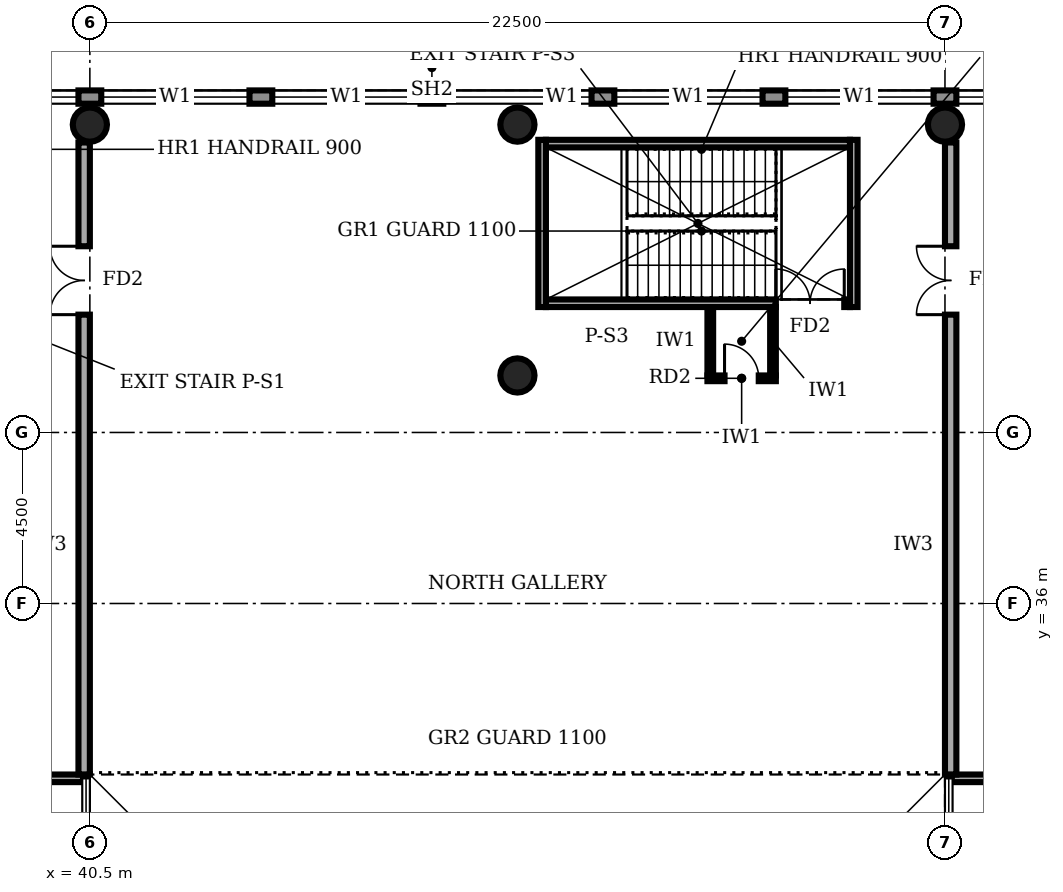
"""IFC4 building model, lengths in metres.
Left out: names, types, materials, properties, quantities, classifications, styles, units other than length and angle.
Written with IfcOpenShell. Run it as: python <this file> out.ifc"""

import sys

from ifc_helpers import new_model, si_unit, direction, frame, frame_2d, origin, origin_2d, place, context, subcontext, project, spatial, rectangle, circle, extrude, element, fill, save


model = new_model("IFC4")
c1 = context("Model", 3, precision=1e-05, world=origin(), true_north=direction((0.0, 1.0)))
c2 = subcontext(c1, "Body", "Model", "MODEL_VIEW")
j1 = project(units=[si_unit("LENGTHUNIT", "METRE"), si_unit("PLANEANGLEUNIT", "RADIAN")], contexts=[c1])
p1 = place(None, origin())
s1 = spatial("IfcSite", under=j1, at=p1, CompositionType="ELEMENT")
p2 = place(p1, origin())
s2 = spatial("IfcBuilding", under=s1, at=p2, CompositionType="ELEMENT")
p3 = place(p2, frame((0.0, 0.0, 11.0)))
s3 = spatial("IfcBuildingStorey", under=s2, at=p3, CompositionType="ELEMENT", Elevation=11.0)
for number, where, z_axis, x_axis in (
    (1, (51.75, 42.0, 0.0), (0.0, 0.0, 1.0), (1.0, 0.0, 0.0)),
    (2, (40.5, 48.6, 0.0), (0.0, 0.0, 1.0), (1.0, 0.0, 0.0)),
    (3, (51.75, 48.6, 0.0), (0.0, 0.0, 1.0), (1.0, 0.0, 0.0)),
    (4, (63.0, 48.6, 0.0), (0.0, 0.0, 1.0), (1.0, 0.0, 0.0)),
):
    element("IfcColumn", number, at=place(p3, frame(where, z_axis=z_axis, x_axis=x_axis)), inside=s3, PredefinedType="COLUMN", context=c2, shape_type="SweptSolid", body=[
        extrude(circle(Radius=0.45, at=origin_2d()), origin(), (0.0, 0.0, 1.0), 5.0),
    ])
p4 = place(p3, frame((98.98, 49.325, 0.0), z_axis=(0.0, 0.0, 1.0), x_axis=(-1.0, 0.0, 0.0)))
e5 = element("IfcWall", 5, at=p4, inside=s3, PredefinedType="STANDARD", context=c2, shape_type="SweptSolid", body=[
    extrude(rectangle(XDim=98.96, YDim=0.35, at=frame_2d((49.48, 0.0))), origin(), (0.0, 0.0, 1.0), 4.7),
])
p5 = place(p4, frame((94.71, 0.0, 0.9)))
e6 = element("IfcOpeningElement", 6, at=p5, cuts=e5, PredefinedType="OPENING", context=c2, shape_type="SweptSolid", body=[
    extrude(rectangle(XDim=3.9, YDim=2.2, at=frame_2d((1.95, 1.1))), frame((0.0, 0.185, 0.0), z_axis=(0.0, -1.0, 0.0), x_axis=(1.0, 0.0, 0.0)), (0.0, 0.0, 1.0), 0.37),
])
p6 = place(p4, frame((90.28, 0.0, 0.9)))
e7 = element("IfcOpeningElement", 7, at=p6, cuts=e5, PredefinedType="OPENING", context=c2, shape_type="SweptSolid", body=[
    extrude(rectangle(XDim=3.9, YDim=2.2, at=frame_2d((1.95, 1.1))), frame((0.0, 0.185, 0.0), z_axis=(0.0, -1.0, 0.0), x_axis=(1.0, 0.0, 0.0)), (0.0, 0.0, 1.0), 0.37),
])
p7 = place(p4, frame((85.78, 0.0, 0.9)))
e8 = element("IfcOpeningElement", 8, at=p7, cuts=e5, PredefinedType="OPENING", context=c2, shape_type="SweptSolid", body=[
    extrude(rectangle(XDim=3.9, YDim=2.2, at=frame_2d((1.95, 1.1))), frame((0.0, 0.185, 0.0), z_axis=(0.0, -1.0, 0.0), x_axis=(1.0, 0.0, 0.0)), (0.0, 0.0, 1.0), 0.37),
])
p8 = place(p4, frame((81.28, 0.0, 0.9)))
e9 = element("IfcOpeningElement", 9, at=p8, cuts=e5, PredefinedType="OPENING", context=c2, shape_type="SweptSolid", body=[
    extrude(rectangle(XDim=3.9, YDim=2.2, at=frame_2d((1.95, 1.1))), frame((0.0, 0.185, 0.0), z_axis=(0.0, -1.0, 0.0), x_axis=(1.0, 0.0, 0.0)), (0.0, 0.0, 1.0), 0.37),
])
p9 = place(p4, frame((76.78, 0.0, 0.9)))
e10 = element("IfcOpeningElement", 10, at=p9, cuts=e5, PredefinedType="OPENING", context=c2, shape_type="SweptSolid", body=[
    extrude(rectangle(XDim=3.9, YDim=2.2, at=frame_2d((1.95, 1.1))), frame((0.0, 0.185, 0.0), z_axis=(0.0, -1.0, 0.0), x_axis=(1.0, 0.0, 0.0)), (0.0, 0.0, 1.0), 0.37),
])
p10 = place(p4, frame((72.28, 0.0, 0.9)))
e11 = element("IfcOpeningElement", 11, at=p10, cuts=e5, PredefinedType="OPENING", context=c2, shape_type="SweptSolid", body=[
    extrude(rectangle(XDim=3.9, YDim=2.2, at=frame_2d((1.95, 1.1))), frame((0.0, 0.185, 0.0), z_axis=(0.0, -1.0, 0.0), x_axis=(1.0, 0.0, 0.0)), (0.0, 0.0, 1.0), 0.37),
])
p11 = place(p4, frame((67.78, 0.0, 0.9)))
e12 = element("IfcOpeningElement", 12, at=p11, cuts=e5, PredefinedType="OPENING", context=c2, shape_type="SweptSolid", body=[
    extrude(rectangle(XDim=3.9, YDim=2.2, at=frame_2d((1.95, 1.1))), frame((0.0, 0.185, 0.0), z_axis=(0.0, -1.0, 0.0), x_axis=(1.0, 0.0, 0.0)), (0.0, 0.0, 1.0), 0.37),
])
p12 = place(p4, frame((63.28, 0.0, 0.9)))
e13 = element("IfcOpeningElement", 13, at=p12, cuts=e5, PredefinedType="OPENING", context=c2, shape_type="SweptSolid", body=[
    extrude(rectangle(XDim=3.9, YDim=2.2, at=frame_2d((1.95, 1.1))), frame((0.0, 0.185, 0.0), z_axis=(0.0, -1.0, 0.0), x_axis=(1.0, 0.0, 0.0)), (0.0, 0.0, 1.0), 0.37),
])
p13 = place(p4, frame((58.78, 0.0, 0.9)))
e14 = element("IfcOpeningElement", 14, at=p13, cuts=e5, PredefinedType="OPENING", context=c2, shape_type="SweptSolid", body=[
    extrude(rectangle(XDim=3.9, YDim=2.2, at=frame_2d((1.95, 1.1))), frame((0.0, 0.185, 0.0), z_axis=(0.0, -1.0, 0.0), x_axis=(1.0, 0.0, 0.0)), (0.0, 0.0, 1.0), 0.37),
])
p14 = place(p4, frame((54.28, 0.0, 0.9)))
e15 = element("IfcOpeningElement", 15, at=p14, cuts=e5, PredefinedType="OPENING", context=c2, shape_type="SweptSolid", body=[
    extrude(rectangle(XDim=3.9, YDim=2.2, at=frame_2d((1.95, 1.1))), frame((0.0, 0.185, 0.0), z_axis=(0.0, -1.0, 0.0), x_axis=(1.0, 0.0, 0.0)), (0.0, 0.0, 1.0), 0.37),
])
p15 = place(p4, frame((49.78, 0.0, 0.9)))
e16 = element("IfcOpeningElement", 16, at=p15, cuts=e5, PredefinedType="OPENING", context=c2, shape_type="SweptSolid", body=[
    extrude(rectangle(XDim=3.9, YDim=2.2, at=frame_2d((1.95, 1.1))), frame((0.0, 0.185, 0.0), z_axis=(0.0, -1.0, 0.0), x_axis=(1.0, 0.0, 0.0)), (0.0, 0.0, 1.0), 0.37),
])
p16 = place(p4, frame((45.28, 0.0, 0.9)))
e17 = element("IfcOpeningElement", 17, at=p16, cuts=e5, PredefinedType="OPENING", context=c2, shape_type="SweptSolid", body=[
    extrude(rectangle(XDim=3.9, YDim=2.2, at=frame_2d((1.95, 1.1))), frame((0.0, 0.185, 0.0), z_axis=(0.0, -1.0, 0.0), x_axis=(1.0, 0.0, 0.0)), (0.0, 0.0, 1.0), 0.37),
])
p17 = place(p4, frame((40.78, 0.0, 0.9)))
e18 = element("IfcOpeningElement", 18, at=p17, cuts=e5, PredefinedType="OPENING", context=c2, shape_type="SweptSolid", body=[
    extrude(rectangle(XDim=3.9, YDim=2.2, at=frame_2d((1.95, 1.1))), frame((0.0, 0.185, 0.0), z_axis=(0.0, -1.0, 0.0), x_axis=(1.0, 0.0, 0.0)), (0.0, 0.0, 1.0), 0.37),
])
p18 = place(p4, frame((36.28, 0.0, 0.9)))
e19 = element("IfcOpeningElement", 19, at=p18, cuts=e5, PredefinedType="OPENING", context=c2, shape_type="SweptSolid", body=[
    extrude(rectangle(XDim=3.9, YDim=2.2, at=frame_2d((1.95, 1.1))), frame((0.0, 0.185, 0.0), z_axis=(0.0, -1.0, 0.0), x_axis=(1.0, 0.0, 0.0)), (0.0, 0.0, 1.0), 0.37),
])
p19 = place(p4, frame((31.78, 0.0, 0.9)))
e20 = element("IfcOpeningElement", 20, at=p19, cuts=e5, PredefinedType="OPENING", context=c2, shape_type="SweptSolid", body=[
    extrude(rectangle(XDim=3.9, YDim=2.2, at=frame_2d((1.95, 1.1))), frame((0.0, 0.185, 0.0), z_axis=(0.0, -1.0, 0.0), x_axis=(1.0, 0.0, 0.0)), (0.0, 0.0, 1.0), 0.37),
])
p20 = place(p4, frame((27.28, 0.0, 0.9)))
e21 = element("IfcOpeningElement", 21, at=p20, cuts=e5, PredefinedType="OPENING", context=c2, shape_type="SweptSolid", body=[
    extrude(rectangle(XDim=3.9, YDim=2.2, at=frame_2d((1.95, 1.1))), frame((0.0, 0.185, 0.0), z_axis=(0.0, -1.0, 0.0), x_axis=(1.0, 0.0, 0.0)), (0.0, 0.0, 1.0), 0.37),
])
p21 = place(p4, frame((22.78, 0.0, 0.9)))
e22 = element("IfcOpeningElement", 22, at=p21, cuts=e5, PredefinedType="OPENING", context=c2, shape_type="SweptSolid", body=[
    extrude(rectangle(XDim=3.9, YDim=2.2, at=frame_2d((1.95, 1.1))), frame((0.0, 0.185, 0.0), z_axis=(0.0, -1.0, 0.0), x_axis=(1.0, 0.0, 0.0)), (0.0, 0.0, 1.0), 0.37),
])
p22 = place(p4, frame((18.28, 0.0, 0.9)))
e23 = element("IfcOpeningElement", 23, at=p22, cuts=e5, PredefinedType="OPENING", context=c2, shape_type="SweptSolid", body=[
    extrude(rectangle(XDim=3.9, YDim=2.2, at=frame_2d((1.95, 1.1))), frame((0.0, 0.185, 0.0), z_axis=(0.0, -1.0, 0.0), x_axis=(1.0, 0.0, 0.0)), (0.0, 0.0, 1.0), 0.37),
])
p23 = place(p4, frame((13.78, 0.0, 0.9)))
e24 = element("IfcOpeningElement", 24, at=p23, cuts=e5, PredefinedType="OPENING", context=c2, shape_type="SweptSolid", body=[
    extrude(rectangle(XDim=3.9, YDim=2.2, at=frame_2d((1.95, 1.1))), frame((0.0, 0.185, 0.0), z_axis=(0.0, -1.0, 0.0), x_axis=(1.0, 0.0, 0.0)), (0.0, 0.0, 1.0), 0.37),
])
p24 = place(p4, frame((9.28, 0.0, 0.9)))
e25 = element("IfcOpeningElement", 25, at=p24, cuts=e5, PredefinedType="OPENING", context=c2, shape_type="SweptSolid", body=[
    extrude(rectangle(XDim=3.9, YDim=2.2, at=frame_2d((1.95, 1.1))), frame((0.0, 0.185, 0.0), z_axis=(0.0, -1.0, 0.0), x_axis=(1.0, 0.0, 0.0)), (0.0, 0.0, 1.0), 0.37),
])
p25 = place(p4, frame((4.78, 0.0, 0.9)))
e26 = element("IfcOpeningElement", 26, at=p25, cuts=e5, PredefinedType="OPENING", context=c2, shape_type="SweptSolid", body=[
    extrude(rectangle(XDim=3.9, YDim=2.2, at=frame_2d((1.95, 1.1))), frame((0.0, 0.185, 0.0), z_axis=(0.0, -1.0, 0.0), x_axis=(1.0, 0.0, 0.0)), (0.0, 0.0, 1.0), 0.37),
])
p26 = place(p3, frame((28.8, 31.4, 0.0), z_axis=(0.0, 0.0, 1.0), x_axis=(1.0, 0.0, 0.0)))
e27 = element("IfcWall", 27, at=p26, inside=s3, PredefinedType="SOLIDWALL", context=c2, shape_type="SweptSolid", body=[
    extrude(rectangle(XDim=11.52, YDim=0.2, at=frame_2d((5.76, 0.0))), origin(), (0.0, 0.0, 1.0), 4.7),
])
p27 = place(p3, frame((63.18, 31.4, 0.0), z_axis=(0.0, 0.0, 1.0), x_axis=(1.0, 0.0, 0.0)))
e28 = element("IfcWall", 28, at=p27, inside=s3, PredefinedType="SOLIDWALL", context=c2, shape_type="SweptSolid", body=[
    extrude(rectangle(XDim=9.27, YDim=0.2, at=frame_2d((4.635, 0.0))), origin(), (0.0, 0.0, 1.0), 4.7),
])
p28 = place(p3, frame((52.5, 43.9, 0.0), z_axis=(0.0, 0.0, 1.0), x_axis=(1.0, 0.0, 0.0)))
e29 = element("IfcWall", 29, at=p28, inside=s3, PredefinedType="SOLIDWALL", context=c2, shape_type="SweptSolid", body=[
    extrude(rectangle(XDim=8.0, YDim=0.2, at=frame_2d((4.0, 0.0))), origin(), (0.0, 0.0, 1.0), 4.7),
])
p29 = place(p28, frame((6.05, 0.0, 0.0)))
e30 = element("IfcOpeningElement", 30, at=p29, cuts=e29, PredefinedType="OPENING", context=c2, shape_type="SweptSolid", body=[
    extrude(rectangle(XDim=1.8, YDim=2.1, at=frame_2d((0.9, 1.05))), frame((0.0, 0.11, 0.0), z_axis=(0.0, -1.0, 0.0), x_axis=(1.0, 0.0, 0.0)), (0.0, 0.0, 1.0), 0.22),
])
p30 = place(p3, frame((52.5, 48.1, 0.0), z_axis=(0.0, 0.0, 1.0), x_axis=(1.0, 0.0, 0.0)))
e31 = element("IfcWall", 31, at=p30, inside=s3, PredefinedType="SOLIDWALL", context=c2, shape_type="SweptSolid", body=[
    extrude(rectangle(XDim=8.0, YDim=0.2, at=frame_2d((4.0, 0.0))), origin(), (0.0, 0.0, 1.0), 4.7),
])
for number, where, z_axis, x_axis in (
    (32, (52.4, 43.8, 0.0), (0.0, 0.0, 1.0), (0.0, 1.0, 0.0)),
    (33, (60.6, 43.8, 0.0), (0.0, 0.0, 1.0), (0.0, 1.0, 0.0)),
):
    element("IfcWall", number, at=place(p3, frame(where, z_axis=z_axis, x_axis=x_axis)), inside=s3, PredefinedType="SOLIDWALL", context=c2, shape_type="SweptSolid", body=[
        extrude(rectangle(XDim=4.4, YDim=0.2, at=frame_2d((2.2, 0.0))), origin(), (0.0, 0.0, 1.0), 4.7),
    ])
p31 = place(p3, frame((40.35, 31.5, 0.0), z_axis=(0.0, 0.0, 1.0), x_axis=(0.0, 1.0, 0.0)))
e34 = element("IfcWall", 34, at=p31, inside=s3, PredefinedType="SOLIDWALL", context=c2, shape_type="SweptSolid", body=[
    extrude(rectangle(XDim=16.63, YDim=0.3, at=frame_2d((8.315, 0.0))), origin(), (0.0, 0.0, 1.0), 4.7),
])
p32 = place(p31, frame((12.1, 0.0, 0.0)))
e35 = element("IfcOpeningElement", 35, at=p32, cuts=e34, PredefinedType="OPENING", context=c2, shape_type="SweptSolid", body=[
    extrude(rectangle(XDim=1.8, YDim=2.1, at=frame_2d((0.9, 1.05))), frame((0.0, 0.16, 0.0), z_axis=(0.0, -1.0, 0.0), x_axis=(1.0, 0.0, 0.0)), (0.0, 0.0, 1.0), 0.32),
])
p33 = place(p3, frame((63.15, 31.5, 0.0), z_axis=(0.0, 0.0, 1.0), x_axis=(0.0, 1.0, 0.0)))
e36 = element("IfcWall", 36, at=p33, inside=s3, PredefinedType="SOLIDWALL", context=c2, shape_type="SweptSolid", body=[
    extrude(rectangle(XDim=16.63, YDim=0.3, at=frame_2d((8.315, 0.0))), origin(), (0.0, 0.0, 1.0), 4.7),
])
p34 = place(p33, frame((12.1, 0.0, 0.0)))
e37 = element("IfcOpeningElement", 37, at=p34, cuts=e36, PredefinedType="OPENING", context=c2, shape_type="SweptSolid", body=[
    extrude(rectangle(XDim=1.8, YDim=2.1, at=frame_2d((0.9, 1.05))), frame((0.0, 0.16, 0.0), z_axis=(0.0, -1.0, 0.0), x_axis=(1.0, 0.0, 0.0)), (0.0, 0.0, 1.0), 0.32),
])
p35 = place(p3, frame((58.475, 42.0, 0.0), z_axis=(0.0, 0.0, 1.0), x_axis=(0.0, 1.0, 0.0)))
e38 = element("IfcWall", 38, at=p35, inside=s3, PredefinedType="PARTITIONING", context=c2, shape_type="SweptSolid", body=[
    extrude(rectangle(XDim=1.8, YDim=0.15, at=frame_2d((0.9, 0.0))), origin(), (0.0, 0.0, 1.0), 4.7),
])
p36 = place(p3, frame((56.75, 41.925, 0.0), z_axis=(0.0, 0.0, 1.0), x_axis=(1.0, 0.0, 0.0)))
e39 = element("IfcWall", 39, at=p36, inside=s3, PredefinedType="PARTITIONING", context=c2, shape_type="SweptSolid", body=[
    extrude(rectangle(XDim=1.8, YDim=0.15, at=frame_2d((0.9, 0.0))), origin(), (0.0, 0.0, 1.0), 4.7),
])
p37 = place(p36, frame((0.45, 0.0, 0.0)))
e40 = element("IfcOpeningElement", 40, at=p37, cuts=e39, PredefinedType="OPENING", context=c2, shape_type="SweptSolid", body=[
    extrude(rectangle(XDim=0.9, YDim=2.1, at=frame_2d((0.45, 1.05))), frame((0.0, 0.085, 0.0), z_axis=(0.0, -1.0, 0.0), x_axis=(1.0, 0.0, 0.0)), (0.0, 0.0, 1.0), 0.17),
])
p38 = place(p3, frame((56.825, 42.0, 0.0), z_axis=(0.0, 0.0, 1.0), x_axis=(0.0, 1.0, 0.0)))
e41 = element("IfcWall", 41, at=p38, inside=s3, PredefinedType="PARTITIONING", context=c2, shape_type="SweptSolid", body=[
    extrude(rectangle(XDim=1.8, YDim=0.15, at=frame_2d((0.9, 0.0))), origin(), (0.0, 0.0, 1.0), 4.7),
])
p39 = place(p13, origin())
e42 = element("IfcWindow", 42, at=p39, inside=s3, PartitioningType="SINGLE_PANEL", PredefinedType="WINDOW", context=c2, shape_type="SweptSolid", body=[
    extrude(rectangle(XDim=3.9, YDim=2.2, at=frame_2d((1.95, 1.1))), frame((0.0, 0.03, 0.0), z_axis=(0.0, -1.0, 0.0), x_axis=(1.0, 0.0, 0.0)), (0.0, 0.0, 1.0), 0.06),
])
fill(e14, e42)
p40 = place(p14, origin())
e43 = element("IfcWindow", 43, at=p40, inside=s3, PartitioningType="SINGLE_PANEL", PredefinedType="WINDOW", context=c2, shape_type="SweptSolid", body=[
    extrude(rectangle(XDim=3.9, YDim=2.2, at=frame_2d((1.95, 1.1))), frame((0.0, 0.03, 0.0), z_axis=(0.0, -1.0, 0.0), x_axis=(1.0, 0.0, 0.0)), (0.0, 0.0, 1.0), 0.06),
])
fill(e15, e43)
p41 = place(p15, origin())
e44 = element("IfcWindow", 44, at=p41, inside=s3, PartitioningType="SINGLE_PANEL", PredefinedType="WINDOW", context=c2, shape_type="SweptSolid", body=[
    extrude(rectangle(XDim=3.9, YDim=2.2, at=frame_2d((1.95, 1.1))), frame((0.0, 0.03, 0.0), z_axis=(0.0, -1.0, 0.0), x_axis=(1.0, 0.0, 0.0)), (0.0, 0.0, 1.0), 0.06),
])
fill(e16, e44)
p42 = place(p16, origin())
e45 = element("IfcWindow", 45, at=p42, inside=s3, PartitioningType="SINGLE_PANEL", PredefinedType="WINDOW", context=c2, shape_type="SweptSolid", body=[
    extrude(rectangle(XDim=3.9, YDim=2.2, at=frame_2d((1.95, 1.1))), frame((0.0, 0.03, 0.0), z_axis=(0.0, -1.0, 0.0), x_axis=(1.0, 0.0, 0.0)), (0.0, 0.0, 1.0), 0.06),
])
fill(e17, e45)
p43 = place(p17, origin())
e46 = element("IfcWindow", 46, at=p43, inside=s3, PartitioningType="SINGLE_PANEL", PredefinedType="WINDOW", context=c2, shape_type="SweptSolid", body=[
    extrude(rectangle(XDim=3.9, YDim=2.2, at=frame_2d((1.95, 1.1))), frame((0.0, 0.03, 0.0), z_axis=(0.0, -1.0, 0.0), x_axis=(1.0, 0.0, 0.0)), (0.0, 0.0, 1.0), 0.06),
])
fill(e18, e46)
p44 = place(p18, origin())
e47 = element("IfcWindow", 47, at=p44, inside=s3, PartitioningType="SINGLE_PANEL", PredefinedType="WINDOW", context=c2, shape_type="SweptSolid", body=[
    extrude(rectangle(XDim=3.9, YDim=2.2, at=frame_2d((1.95, 1.1))), frame((0.0, 0.03, 0.0), z_axis=(0.0, -1.0, 0.0), x_axis=(1.0, 0.0, 0.0)), (0.0, 0.0, 1.0), 0.06),
])
fill(e19, e47)
p45 = place(p19, origin())
e48 = element("IfcWindow", 48, at=p45, inside=s3, PartitioningType="SINGLE_PANEL", PredefinedType="WINDOW", context=c2, shape_type="SweptSolid", body=[
    extrude(rectangle(XDim=3.9, YDim=2.2, at=frame_2d((1.95, 1.1))), frame((0.0, 0.03, 0.0), z_axis=(0.0, -1.0, 0.0), x_axis=(1.0, 0.0, 0.0)), (0.0, 0.0, 1.0), 0.06),
])
fill(e20, e48)
p46 = place(p29, origin())
e49 = element("IfcDoor", 49, at=p46, inside=s3, OperationType="DOUBLE_DOOR_SINGLE_SWING", PredefinedType="DOOR", context=c2, shape_type="SweptSolid", body=[
    extrude(rectangle(XDim=1.8, YDim=2.1, at=frame_2d((0.9, 1.05))), frame((0.0, 0.025, 0.0), z_axis=(0.0, -1.0, 0.0), x_axis=(1.0, 0.0, 0.0)), (0.0, 0.0, 1.0), 0.05),
])
fill(e30, e49)
p47 = place(p32, origin())
e50 = element("IfcDoor", 50, at=p47, inside=s3, OperationType="DOUBLE_DOOR_SINGLE_SWING", PredefinedType="DOOR", context=c2, shape_type="SweptSolid", body=[
    extrude(rectangle(XDim=1.8, YDim=2.1, at=frame_2d((0.9, 1.05))), frame((0.0, 0.025, 0.0), z_axis=(0.0, -1.0, 0.0), x_axis=(1.0, 0.0, 0.0)), (0.0, 0.0, 1.0), 0.05),
])
fill(e35, e50)
p48 = place(p34, origin())
e51 = element("IfcDoor", 51, at=p48, inside=s3, OperationType="DOUBLE_DOOR_SINGLE_SWING", PredefinedType="DOOR", context=c2, shape_type="SweptSolid", body=[
    extrude(rectangle(XDim=1.8, YDim=2.1, at=frame_2d((0.9, 1.05))), frame((0.0, 0.025, 0.0), z_axis=(0.0, -1.0, 0.0), x_axis=(1.0, 0.0, 0.0)), (0.0, 0.0, 1.0), 0.05),
])
fill(e37, e51)
p49 = place(p37, origin())
e52 = element("IfcDoor", 52, at=p49, inside=s3, OperationType="SINGLE_SWING_LEFT", PredefinedType="DOOR", context=c2, shape_type="SweptSolid", body=[
    extrude(rectangle(XDim=0.9, YDim=2.1, at=frame_2d((0.45, 1.05))), frame((0.0, 0.025, 0.0), z_axis=(0.0, -1.0, 0.0), x_axis=(1.0, 0.0, 0.0)), (0.0, 0.0, 1.0), 0.05),
])
fill(e40, e52)
save(model, sys.argv[1])
